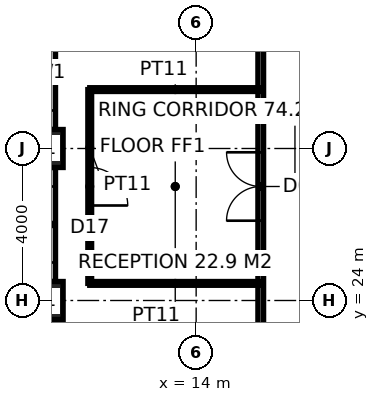
"""IFC4 building model, lengths in metres.
Left out: names, types, materials, properties, quantities, classifications, styles, units other than length and angle.
Written with IfcOpenShell. Run it as: python <this file> out.ifc"""

import sys

from ifc_helpers import new_model, si_unit, direction, frame, frame_2d, origin, origin_2d, place, context, subcontext, project, spatial, rectangle, hollow_rectangle, extrude, element, fill, save


model = new_model("IFC4")
c1 = context("Model", 3, precision=1e-05, world=origin(), true_north=direction((0.0, 1.0)))
c2 = subcontext(c1, "Body", "Model", "MODEL_VIEW")
j1 = project(units=[si_unit("LENGTHUNIT", "METRE"), si_unit("PLANEANGLEUNIT", "RADIAN")], contexts=[c1])
p1 = place(None, origin())
s1 = spatial("IfcSite", under=j1, at=p1, CompositionType="ELEMENT")
p2 = place(p1, origin())
s2 = spatial("IfcBuilding", under=s1, at=p2, CompositionType="ELEMENT")
p3 = place(p2, frame((0.0, 0.0, 226.2)))
s3 = spatial("IfcBuildingStorey", under=s2, at=p3, CompositionType="ELEMENT", Elevation=226.2)
for number, where, z_axis, x_axis in (
    (1, (10.0, 24.0, 0.0), (0.0, 0.0, 1.0), (1.0, 0.0, 0.0)),
    (2, (10.0, 28.0, 0.0), (0.0, 0.0, 1.0), (1.0, 0.0, 0.0)),
):
    element("IfcColumn", number, at=place(p3, frame(where, z_axis=z_axis, x_axis=x_axis)), inside=s3, PredefinedType="COLUMN", context=c2, shape_type="SweptSolid", body=[
        extrude(hollow_rectangle(XDim=1.0, YDim=1.0, WallThickness=0.1, at=origin_2d()), origin(), (0.0, 0.0, 1.0), 4.0),
    ])
p4 = place(p3, frame((15.7, 15.625, 0.0), z_axis=(0.0, 0.0, 1.0), x_axis=(0.0, 1.0, 0.0)))
e3 = element("IfcWall", 3, at=p4, inside=s3, PredefinedType="PARTITIONING", context=c2, shape_type="SweptSolid", body=[
    extrude(rectangle(XDim=22.75, YDim=0.15, at=frame_2d((11.375, 0.0))), origin(), (0.0, 0.0, 1.0), 3.85),
])
p5 = place(p4, frame((10.475, 0.0, 0.0)))
e4 = element("IfcOpeningElement", 4, at=p5, cuts=e3, PredefinedType="OPENING", context=c2, shape_type="SweptSolid", body=[
    extrude(rectangle(XDim=1.8, YDim=2.4, at=frame_2d((0.9, 1.2))), frame((0.0, 0.085, 0.0), z_axis=(0.0, -1.0, 0.0), x_axis=(1.0, 0.0, 0.0)), (0.0, 0.0, 1.0), 0.17),
])
p6 = place(p3, frame((15.7, 29.55, 0.0), z_axis=(0.0, 0.0, 1.0), x_axis=(-1.0, 0.0, 0.0)))
e5 = element("IfcWall", 5, at=p6, inside=s3, PredefinedType="PARTITIONING", context=c2, shape_type="SweptSolid", body=[
    extrude(rectangle(XDim=4.5, YDim=0.1, at=frame_2d((2.25, 0.0))), origin(), (0.0, 0.0, 1.0), 3.85),
])
p7 = place(p3, frame((11.2, 29.55, 0.0), z_axis=(0.0, 0.0, 1.0), x_axis=(0.0, -1.0, 0.0)))
e6 = element("IfcWall", 6, at=p7, inside=s3, PredefinedType="PARTITIONING", context=c2, shape_type="SweptSolid", body=[
    extrude(rectangle(XDim=5.1, YDim=0.1, at=frame_2d((2.55, 0.0))), origin(), (0.0, 0.0, 1.0), 3.85),
])
p8 = place(p7, frame((2.05, 0.0, 0.0)))
e7 = element("IfcOpeningElement", 7, at=p8, cuts=e6, PredefinedType="OPENING", context=c2, shape_type="SweptSolid", body=[
    extrude(rectangle(XDim=1.0, YDim=2.2, at=frame_2d((0.5, 1.1))), frame((0.0, 0.06, 0.0), z_axis=(0.0, -1.0, 0.0), x_axis=(1.0, 0.0, 0.0)), (0.0, 0.0, 1.0), 0.12),
])
p9 = place(p3, frame((11.2, 24.45, 0.0), z_axis=(0.0, 0.0, 1.0), x_axis=(1.0, 0.0, 0.0)))
e8 = element("IfcWall", 8, at=p9, inside=s3, PredefinedType="PARTITIONING", context=c2, shape_type="SweptSolid", body=[
    extrude(rectangle(XDim=4.5, YDim=0.1, at=frame_2d((2.25, 0.0))), origin(), (0.0, 0.0, 1.0), 2.95),
])
p10 = place(p3, frame((10.15, 23.5, 0.0), z_axis=(0.0, 0.0, 1.0), x_axis=(0.0, -1.0, 0.0)))
e9 = element("IfcWall", 9, at=p10, inside=s3, PredefinedType="ELEMENTEDWALL", context=c2, shape_type="SweptSolid", body=[
    extrude(rectangle(XDim=3.0, YDim=0.3, at=frame_2d((1.5, 0.0))), origin(), (0.0, 0.0, 1.0), 2.85),
])
p11 = place(p10, frame((0.5, 0.0, 0.8)))
e10 = element("IfcOpeningElement", 10, at=p11, cuts=e9, PredefinedType="OPENING", context=c2, shape_type="SweptSolid", body=[
    extrude(rectangle(XDim=2.0, YDim=2.0, at=frame_2d((1.0, 1.0))), frame((0.0, 0.16, 0.0), z_axis=(0.0, -1.0, 0.0), x_axis=(1.0, 0.0, 0.0)), (0.0, 0.0, 1.0), 0.32),
])
p12 = place(p3, frame((10.15, 27.5, 0.0), z_axis=(0.0, 0.0, 1.0), x_axis=(0.0, -1.0, 0.0)))
e11 = element("IfcWall", 11, at=p12, inside=s3, PredefinedType="ELEMENTEDWALL", context=c2, shape_type="SweptSolid", body=[
    extrude(rectangle(XDim=3.0, YDim=0.3, at=frame_2d((1.5, 0.0))), origin(), (0.0, 0.0, 1.0), 2.85),
])
p13 = place(p12, frame((0.5, 0.0, 0.8)))
e12 = element("IfcOpeningElement", 12, at=p13, cuts=e11, PredefinedType="OPENING", context=c2, shape_type="SweptSolid", body=[
    extrude(rectangle(XDim=2.0, YDim=2.0, at=frame_2d((1.0, 1.0))), frame((0.0, 0.16, 0.0), z_axis=(0.0, -1.0, 0.0), x_axis=(1.0, 0.0, 0.0)), (0.0, 0.0, 1.0), 0.32),
])
p14 = place(p3, frame((10.15, 31.5, 0.0), z_axis=(0.0, 0.0, 1.0), x_axis=(0.0, -1.0, 0.0)))
e13 = element("IfcWall", 13, at=p14, inside=s3, PredefinedType="ELEMENTEDWALL", context=c2, shape_type="SweptSolid", body=[
    extrude(rectangle(XDim=3.0, YDim=0.3, at=frame_2d((1.5, 0.0))), origin(), (0.0, 0.0, 1.0), 2.85),
])
p15 = place(p14, frame((0.5, 0.0, 0.8)))
e14 = element("IfcOpeningElement", 14, at=p15, cuts=e13, PredefinedType="OPENING", context=c2, shape_type="SweptSolid", body=[
    extrude(rectangle(XDim=2.0, YDim=2.0, at=frame_2d((1.0, 1.0))), frame((0.0, 0.16, 0.0), z_axis=(0.0, -1.0, 0.0), x_axis=(1.0, 0.0, 0.0)), (0.0, 0.0, 1.0), 0.32),
])
p16 = place(p5, origin())
e15 = element("IfcDoor", 15, at=p16, inside=s3, OperationType="DOUBLE_DOOR_DOUBLE_SWING", PredefinedType="DOOR", context=c2, shape_type="SweptSolid", body=[
    extrude(rectangle(XDim=1.8, YDim=2.4, at=frame_2d((0.9, 1.2))), frame((0.0, 0.025, 0.0), z_axis=(0.0, -1.0, 0.0), x_axis=(1.0, 0.0, 0.0)), (0.0, 0.0, 1.0), 0.05),
])
fill(e4, e15)
p17 = place(p8, origin())
e16 = element("IfcDoor", 16, at=p17, inside=s3, OperationType="SINGLE_SWING_RIGHT", PredefinedType="DOOR", context=c2, shape_type="SweptSolid", body=[
    extrude(rectangle(XDim=1.0, YDim=2.2, at=frame_2d((0.5, 1.1))), frame((0.0, 0.025, 0.0), z_axis=(0.0, -1.0, 0.0), x_axis=(1.0, 0.0, 0.0)), (0.0, 0.0, 1.0), 0.05),
])
fill(e7, e16)
save(model, sys.argv[1])
